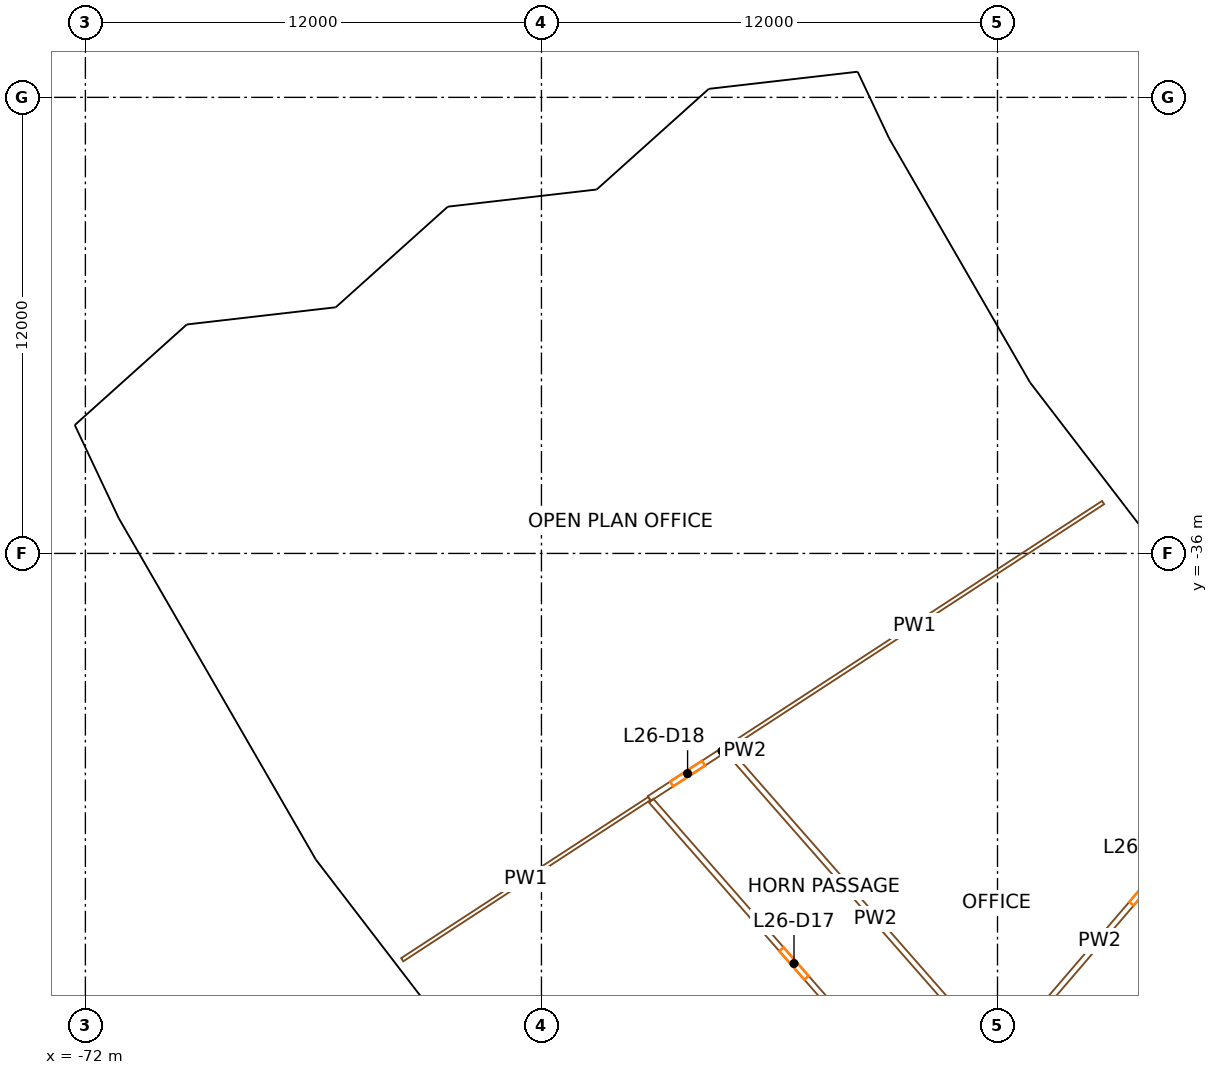
"""IFC4 building model, lengths in metres.
Left out: names, types, materials, properties, quantities, classifications, styles, units other than length and angle.
Written with IfcOpenShell. Run it as: python <this file> out.ifc"""

import sys

from ifc_helpers import new_model, si_unit, direction, frame, frame_2d, origin, origin_2d, place, context, subcontext, project, spatial, rectangle, extrude, element, fill, save


model = new_model("IFC4")
c1 = context("Model", 3, precision=1e-05, world=origin(), true_north=direction((0.0, 1.0)))
c2 = subcontext(c1, "Body", "Model", "MODEL_VIEW")
j1 = project(units=[si_unit("LENGTHUNIT", "METRE"), si_unit("PLANEANGLEUNIT", "RADIAN")], contexts=[c1])
p1 = place(None, origin())
s1 = spatial("IfcSite", under=j1, at=p1, CompositionType="ELEMENT")
p2 = place(p1, origin())
s2 = spatial("IfcBuilding", under=s1, at=p2, CompositionType="ELEMENT")
p3 = place(p2, frame((0.0, 0.0, 117.7)))
s3 = spatial("IfcBuildingStorey", under=s2, at=p3, CompositionType="ELEMENT", Elevation=117.7)
for number, where, z_axis, x_axis in (
    (1, (-52.243, -25.763, 0.0), (0.0, 0.0, 1.0), (0.442, -0.897, 0.0)),
    (2, (-69.732, -34.388, 0.0), (0.0, 0.0, 1.0), (0.442, -0.897, 0.0)),
    (3, (-48.433, -32.362, 0.0), (0.0, 0.0, 1.0), (0.556, -0.831, 0.0)),
    (4, (-64.647, -43.196, 0.0), (0.0, 0.0, 1.0), (0.556, -0.831, 0.0)),
    (5, (-43.795, -38.407, 0.0), (0.0, 0.0, 1.0), (0.659, -0.752, 0.0)),
):
    element("IfcColumn", number, at=place(p3, frame(where, z_axis=z_axis, x_axis=x_axis)), inside=s3, PredefinedType="COLUMN", context=c2, shape_type="SweptSolid", body=[
        extrude(rectangle(XDim=1.2, YDim=1.5, at=origin_2d()), origin(), (0.0, 0.0, 1.0), 3.8),
    ])
p4 = place(p3, frame((-49.779, -57.191, 0.0), z_axis=(0.0, 0.0, 1.0), x_axis=(0.573577477574, 0.819151315216, 0.0)))
e6 = element("IfcWall", 6, at=p4, inside=s3, PredefinedType="SHEAR", context=c2, shape_type="SweptSolid", body=[
    extrude(rectangle(XDim=14.8, YDim=0.9, at=frame_2d((7.4, 0.0))), origin(), (0.0, 0.0, 1.0), 3.5),
])
p5 = place(p4, frame((6.7, 0.0, 0.0)))
e7 = element("IfcOpeningElement", 7, at=p5, cuts=e6, PredefinedType="OPENING", context=c2, shape_type="SweptSolid", body=[
    extrude(rectangle(XDim=1.4, YDim=2.1, at=frame_2d((0.7, 1.05))), frame((0.0, 0.46, 0.0), z_axis=(0.0, -1.0, 0.0), x_axis=(1.0, 0.0, 0.0)), (0.0, 0.0, 1.0), 0.92),
])
p6 = place(p3, frame((-52.048, -23.569, 0.0), z_axis=(0.0, 0.0, 1.0), x_axis=(-0.993433070423, -0.114414748132, 0.0)))
e8 = element("IfcWall", 8, at=p6, inside=s3, PredefinedType="SOLIDWALL", context=c2, shape_type="SweptSolid", body=[
    extrude(rectangle(XDim=3.275, YDim=0.4, at=frame_2d((1.638, 0.0))), origin(), (0.0, 0.0, 1.0), 2.7),
])
p7 = place(p6, frame((0.638, 0.0, 0.9)))
e9 = element("IfcOpeningElement", 9, at=p7, cuts=e8, PredefinedType="OPENING", context=c2, shape_type="SweptSolid", body=[
    extrude(rectangle(XDim=2.0, YDim=1.425, at=frame_2d((1.0, 0.712))), frame((0.0, 0.21, 0.0), z_axis=(0.0, -1.0, 0.0), x_axis=(1.0, 0.0, 0.0)), (0.0, 0.0, 1.0), 0.42),
])
p8 = place(p3, frame((-55.424, -23.891, 0.0), z_axis=(0.0, 0.0, 1.0), x_axis=(-0.744202221748, -0.667954379539, 0.0)))
e10 = element("IfcWall", 10, at=p8, inside=s3, PredefinedType="SOLIDWALL", context=c2, shape_type="SweptSolid", body=[
    extrude(rectangle(XDim=4.195, YDim=0.4, at=frame_2d((2.097, 0.0))), origin(), (0.0, 0.0, 1.0), 2.7),
])
p9 = place(p8, frame((1.097, 0.0, 0.9)))
e11 = element("IfcOpeningElement", 11, at=p9, cuts=e10, PredefinedType="OPENING", context=c2, shape_type="SweptSolid", body=[
    extrude(rectangle(XDim=2.0, YDim=1.425, at=frame_2d((1.0, 0.712))), frame((0.0, 0.21, 0.0), z_axis=(0.0, -1.0, 0.0), x_axis=(1.0, 0.0, 0.0)), (0.0, 0.0, 1.0), 0.42),
])
p10 = place(p3, frame((-58.668, -26.64, 0.0), z_axis=(0.0, 0.0, 1.0), x_axis=(-0.993423489037, -0.114497910151, 0.0)))
e12 = element("IfcWall", 12, at=p10, inside=s3, PredefinedType="SOLIDWALL", context=c2, shape_type="SweptSolid", body=[
    extrude(rectangle(XDim=3.525, YDim=0.4, at=frame_2d((1.762, 0.0))), origin(), (0.0, 0.0, 1.0), 2.7),
])
p11 = place(p10, frame((0.762, 0.0, 0.9)))
e13 = element("IfcOpeningElement", 13, at=p11, cuts=e12, PredefinedType="OPENING", context=c2, shape_type="SweptSolid", body=[
    extrude(rectangle(XDim=2.0, YDim=1.425, at=frame_2d((1.0, 0.712))), frame((0.0, 0.21, 0.0), z_axis=(0.0, -1.0, 0.0), x_axis=(1.0, 0.0, 0.0)), (0.0, 0.0, 1.0), 0.42),
])
p12 = place(p3, frame((-62.292, -26.99, 0.0), z_axis=(0.0, 0.0, 1.0), x_axis=(-0.744130218911, -0.668034592894, 0.0)))
e14 = element("IfcWall", 14, at=p12, inside=s3, PredefinedType="SOLIDWALL", context=c2, shape_type="SweptSolid", body=[
    extrude(rectangle(XDim=4.193, YDim=0.4, at=frame_2d((2.097, 0.0))), origin(), (0.0, 0.0, 1.0), 2.7),
])
p13 = place(p12, frame((1.097, 0.0, 0.9)))
e15 = element("IfcOpeningElement", 15, at=p13, cuts=e14, PredefinedType="OPENING", context=c2, shape_type="SweptSolid", body=[
    extrude(rectangle(XDim=2.0, YDim=1.425, at=frame_2d((1.0, 0.712))), frame((0.0, 0.21, 0.0), z_axis=(0.0, -1.0, 0.0), x_axis=(1.0, 0.0, 0.0)), (0.0, 0.0, 1.0), 0.42),
])
p14 = place(p3, frame((-65.534, -29.739, 0.0), z_axis=(0.0, 0.0, 1.0), x_axis=(-0.993412271187, -0.114595198217, 0.0)))
e16 = element("IfcWall", 16, at=p14, inside=s3, PredefinedType="SOLIDWALL", context=c2, shape_type="SweptSolid", body=[
    extrude(rectangle(XDim=3.526, YDim=0.4, at=frame_2d((1.763, 0.0))), origin(), (0.0, 0.0, 1.0), 2.7),
])
p15 = place(p14, frame((0.763, 0.0, 0.9)))
e17 = element("IfcOpeningElement", 17, at=p15, cuts=e16, PredefinedType="OPENING", context=c2, shape_type="SweptSolid", body=[
    extrude(rectangle(XDim=2.0, YDim=1.425, at=frame_2d((1.0, 0.712))), frame((0.0, 0.21, 0.0), z_axis=(0.0, -1.0, 0.0), x_axis=(1.0, 0.0, 0.0)), (0.0, 0.0, 1.0), 0.42),
])
p16 = place(p3, frame((-69.159, -30.09, 0.0), z_axis=(0.0, 0.0, 1.0), x_axis=(-0.744101163547, -0.66806695653, 0.0)))
e18 = element("IfcWall", 18, at=p16, inside=s3, PredefinedType="SOLIDWALL", context=c2, shape_type="SweptSolid", body=[
    extrude(rectangle(XDim=4.014, YDim=0.4, at=frame_2d((2.007, 0.0))), origin(), (0.0, 0.0, 1.0), 2.7),
])
p17 = place(p16, frame((1.007, 0.0, 0.9)))
e19 = element("IfcOpeningElement", 19, at=p17, cuts=e18, PredefinedType="OPENING", context=c2, shape_type="SweptSolid", body=[
    extrude(rectangle(XDim=2.0, YDim=1.425, at=frame_2d((1.0, 0.712))), frame((0.0, 0.21, 0.0), z_axis=(0.0, -1.0, 0.0), x_axis=(1.0, 0.0, 0.0)), (0.0, 0.0, 1.0), 0.42),
])
p18 = place(p3, frame((-51.024, -25.184, 0.0), z_axis=(0.0, 0.0, 1.0), x_axis=(-0.426862665896, 0.904316462564, 0.0)))
e20 = element("IfcWall", 20, at=p18, inside=s3, PredefinedType="SOLIDWALL", context=c2, shape_type="SweptSolid", body=[
    extrude(rectangle(XDim=2.008, YDim=0.4, at=frame_2d((1.004, 0.0))), origin(), (0.0, 0.0, 1.0), 2.7),
])
p19 = place(p3, frame((-47.336, -31.568, 0.0), z_axis=(0.0, 0.0, 1.0), x_axis=(-0.499990592807, 0.866030834962, 0.0)))
e21 = element("IfcWall", 21, at=p19, inside=s3, PredefinedType="SOLIDWALL", context=c2, shape_type="SweptSolid", body=[
    extrude(rectangle(XDim=7.356, YDim=0.4, at=frame_2d((3.678, 0.0))), origin(), (0.0, 0.0, 1.0), 2.7),
])
p20 = place(p19, frame((4.225, 0.0, 0.9)))
e22 = element("IfcOpeningElement", 22, at=p20, cuts=e21, PredefinedType="OPENING", context=c2, shape_type="SweptSolid", body=[
    extrude(rectangle(XDim=2.6, YDim=1.65, at=frame_2d((1.3, 0.825))), frame((0.0, 0.21, 0.0), z_axis=(0.0, -1.0, 0.0), x_axis=(1.0, 0.0, 0.0)), (0.0, 0.0, 1.0), 0.42),
])
p21 = place(p19, frame((0.517, 0.0, 0.9)))
e23 = element("IfcOpeningElement", 23, at=p21, cuts=e21, PredefinedType="OPENING", context=c2, shape_type="SweptSolid", body=[
    extrude(rectangle(XDim=2.6, YDim=1.65, at=frame_2d((1.3, 0.825))), frame((0.0, 0.21, 0.0), z_axis=(0.0, -1.0, 0.0), x_axis=(1.0, 0.0, 0.0)), (0.0, 0.0, 1.0), 0.42),
])
p22 = place(p3, frame((-42.765, -37.537, 0.0), z_axis=(0.0, 0.0, 1.0), x_axis=(-0.608748204711, 0.793363487476, 0.0)))
e24 = element("IfcWall", 24, at=p22, inside=s3, PredefinedType="SOLIDWALL", context=c2, shape_type="SweptSolid", body=[
    extrude(rectangle(XDim=7.493, YDim=0.4, at=frame_2d((3.747, 0.0))), origin(), (0.0, 0.0, 1.0), 2.7),
])
p23 = place(p22, frame((4.301, 0.0, 0.9)))
e25 = element("IfcOpeningElement", 25, at=p23, cuts=e24, PredefinedType="OPENING", context=c2, shape_type="SweptSolid", body=[
    extrude(rectangle(XDim=2.6, YDim=1.65, at=frame_2d((1.3, 0.825))), frame((0.0, 0.21, 0.0), z_axis=(0.0, -1.0, 0.0), x_axis=(1.0, 0.0, 0.0)), (0.0, 0.0, 1.0), 0.42),
])
p24 = place(p22, frame((0.592, 0.0, 0.9)))
e26 = element("IfcOpeningElement", 26, at=p24, cuts=e24, PredefinedType="OPENING", context=c2, shape_type="SweptSolid", body=[
    extrude(rectangle(XDim=2.6, YDim=1.65, at=frame_2d((1.3, 0.825))), frame((0.0, 0.21, 0.0), z_axis=(0.0, -1.0, 0.0), x_axis=(1.0, 0.0, 0.0)), (0.0, 0.0, 1.0), 0.42),
])
p25 = place(p3, frame((-63.663, -46.691, 0.0), z_axis=(0.0, 0.0, 1.0), x_axis=(0.837558660213, 0.546347408433, 0.0)))
e27 = element("IfcWall", 27, at=p25, inside=s3, PredefinedType="PARTITIONING", context=c2, shape_type="SweptSolid", body=[
    extrude(rectangle(XDim=7.762, YDim=0.1, at=frame_2d((3.881, 0.0))), origin(), (0.0, 0.0, 1.0), 2.4),
])
p26 = place(p3, frame((-57.162, -42.45, 0.0), z_axis=(0.0, 0.0, 1.0), x_axis=(0.837554034944, 0.546354498974, 0.0)))
e28 = element("IfcWall", 28, at=p26, inside=s3, PredefinedType="PARTITIONING", context=c2, shape_type="SweptSolid", body=[
    extrude(rectangle(XDim=2.405, YDim=0.15, at=frame_2d((1.202, 0.0))), origin(), (0.0, 0.0, 1.0), 2.4),
])
p27 = place(p26, frame((0.702, 0.0, 0.0)))
e29 = element("IfcOpeningElement", 29, at=p27, cuts=e28, PredefinedType="OPENING", context=c2, shape_type="SweptSolid", body=[
    extrude(rectangle(XDim=1.0, YDim=2.1, at=frame_2d((0.5, 1.05))), frame((0.0, 0.085, 0.0), z_axis=(0.0, -1.0, 0.0), x_axis=(1.0, 0.0, 0.0)), (0.0, 0.0, 1.0), 0.17),
])
p28 = place(p3, frame((-55.148, -41.136, 0.0), z_axis=(0.0, 0.0, 1.0), x_axis=(0.837561412918, 0.546343188473, 0.0)))
e30 = element("IfcWall", 30, at=p28, inside=s3, PredefinedType="PARTITIONING", context=c2, shape_type="SweptSolid", body=[
    extrude(rectangle(XDim=11.851, YDim=0.1, at=frame_2d((5.925, 0.0))), origin(), (0.0, 0.0, 1.0), 2.4),
])
p29 = place(p3, frame((-49.597, -51.075, 0.0), z_axis=(0.0, 0.0, 1.0), x_axis=(-0.659347342495, 0.751838467987, 0.0)))
e31 = element("IfcWall", 31, at=p29, inside=s3, PredefinedType="PARTITIONING", context=c2, shape_type="SweptSolid", body=[
    extrude(rectangle(XDim=11.398, YDim=0.15, at=frame_2d((5.699, 0.0))), origin(), (0.0, 0.0, 1.0), 2.4),
])
p30 = place(p29, frame((5.199, 0.0, 0.0)))
e32 = element("IfcOpeningElement", 32, at=p30, cuts=e31, PredefinedType="OPENING", context=c2, shape_type="SweptSolid", body=[
    extrude(rectangle(XDim=1.0, YDim=2.1, at=frame_2d((0.5, 1.05))), frame((0.0, 0.085, 0.0), z_axis=(0.0, -1.0, 0.0), x_axis=(1.0, 0.0, 0.0)), (0.0, 0.0, 1.0), 0.17),
])
p31 = place(p3, frame((-48.032, -49.25, 0.0), z_axis=(0.0, 0.0, 1.0), x_axis=(-0.659337984036, 0.751846675066, 0.0)))
e33 = element("IfcWall", 33, at=p31, inside=s3, PredefinedType="PARTITIONING", context=c2, shape_type="SweptSolid", body=[
    extrude(rectangle(XDim=10.718, YDim=0.15, at=frame_2d((5.359, 0.0))), origin(), (0.0, 0.0, 1.0), 2.4),
])
p32 = place(p3, frame((-48.031, -49.364, 0.0), z_axis=(0.0, 0.0, 1.0), x_axis=(0.650981860867, 0.759093285982, 0.0)))
e34 = element("IfcWall", 34, at=p32, inside=s3, PredefinedType="PARTITIONING", context=c2, shape_type="SweptSolid", body=[
    extrude(rectangle(XDim=11.926, YDim=0.15, at=frame_2d((5.963, 0.0))), origin(), (0.0, 0.0, 1.0), 2.4),
])
p33 = place(p32, frame((5.463, 0.0, 0.0)))
e35 = element("IfcOpeningElement", 35, at=p33, cuts=e34, PredefinedType="OPENING", context=c2, shape_type="SweptSolid", body=[
    extrude(rectangle(XDim=1.0, YDim=2.1, at=frame_2d((0.5, 1.05))), frame((0.0, 0.085, 0.0), z_axis=(0.0, -1.0, 0.0), x_axis=(1.0, 0.0, 0.0)), (0.0, 0.0, 1.0), 0.17),
])
p34 = place(p20, origin())
e36 = element("IfcWindow", 36, at=p34, inside=s3, PartitioningType="SINGLE_PANEL", PredefinedType="WINDOW", context=c2, shape_type="SweptSolid", body=[
    extrude(rectangle(XDim=2.6, YDim=1.65, at=frame_2d((1.3, 0.825))), frame((0.0, 0.03, 0.0), z_axis=(0.0, -1.0, 0.0), x_axis=(1.0, 0.0, 0.0)), (0.0, 0.0, 1.0), 0.06),
])
fill(e22, e36)
p35 = place(p21, origin())
e37 = element("IfcWindow", 37, at=p35, inside=s3, PartitioningType="SINGLE_PANEL", PredefinedType="WINDOW", context=c2, shape_type="SweptSolid", body=[
    extrude(rectangle(XDim=2.6, YDim=1.65, at=frame_2d((1.3, 0.825))), frame((0.0, 0.03, 0.0), z_axis=(0.0, -1.0, 0.0), x_axis=(1.0, 0.0, 0.0)), (0.0, 0.0, 1.0), 0.06),
])
fill(e23, e37)
p36 = place(p23, origin())
e38 = element("IfcWindow", 38, at=p36, inside=s3, PartitioningType="SINGLE_PANEL", PredefinedType="WINDOW", context=c2, shape_type="SweptSolid", body=[
    extrude(rectangle(XDim=2.6, YDim=1.65, at=frame_2d((1.3, 0.825))), frame((0.0, 0.03, 0.0), z_axis=(0.0, -1.0, 0.0), x_axis=(1.0, 0.0, 0.0)), (0.0, 0.0, 1.0), 0.06),
])
fill(e25, e38)
p37 = place(p24, origin())
e39 = element("IfcWindow", 39, at=p37, inside=s3, PartitioningType="SINGLE_PANEL", PredefinedType="WINDOW", context=c2, shape_type="SweptSolid", body=[
    extrude(rectangle(XDim=2.6, YDim=1.65, at=frame_2d((1.3, 0.825))), frame((0.0, 0.03, 0.0), z_axis=(0.0, -1.0, 0.0), x_axis=(1.0, 0.0, 0.0)), (0.0, 0.0, 1.0), 0.06),
])
fill(e26, e39)
p38 = place(p7, origin())
e40 = element("IfcWindow", 40, at=p38, inside=s3, PartitioningType="SINGLE_PANEL", PredefinedType="WINDOW", context=c2, shape_type="SweptSolid", body=[
    extrude(rectangle(XDim=2.0, YDim=1.425, at=frame_2d((1.0, 0.712))), frame((0.0, 0.03, 0.0), z_axis=(0.0, -1.0, 0.0), x_axis=(1.0, 0.0, 0.0)), (0.0, 0.0, 1.0), 0.06),
])
fill(e9, e40)
p39 = place(p9, origin())
e41 = element("IfcWindow", 41, at=p39, inside=s3, PartitioningType="SINGLE_PANEL", PredefinedType="WINDOW", context=c2, shape_type="SweptSolid", body=[
    extrude(rectangle(XDim=2.0, YDim=1.425, at=frame_2d((1.0, 0.712))), frame((0.0, 0.03, 0.0), z_axis=(0.0, -1.0, 0.0), x_axis=(1.0, 0.0, 0.0)), (0.0, 0.0, 1.0), 0.06),
])
fill(e11, e41)
p40 = place(p11, origin())
e42 = element("IfcWindow", 42, at=p40, inside=s3, PartitioningType="SINGLE_PANEL", PredefinedType="WINDOW", context=c2, shape_type="SweptSolid", body=[
    extrude(rectangle(XDim=2.0, YDim=1.425, at=frame_2d((1.0, 0.712))), frame((0.0, 0.03, 0.0), z_axis=(0.0, -1.0, 0.0), x_axis=(1.0, 0.0, 0.0)), (0.0, 0.0, 1.0), 0.06),
])
fill(e13, e42)
p41 = place(p13, origin())
e43 = element("IfcWindow", 43, at=p41, inside=s3, PartitioningType="SINGLE_PANEL", PredefinedType="WINDOW", context=c2, shape_type="SweptSolid", body=[
    extrude(rectangle(XDim=2.0, YDim=1.425, at=frame_2d((1.0, 0.712))), frame((0.0, 0.03, 0.0), z_axis=(0.0, -1.0, 0.0), x_axis=(1.0, 0.0, 0.0)), (0.0, 0.0, 1.0), 0.06),
])
fill(e15, e43)
p42 = place(p15, origin())
e44 = element("IfcWindow", 44, at=p42, inside=s3, PartitioningType="SINGLE_PANEL", PredefinedType="WINDOW", context=c2, shape_type="SweptSolid", body=[
    extrude(rectangle(XDim=2.0, YDim=1.425, at=frame_2d((1.0, 0.712))), frame((0.0, 0.03, 0.0), z_axis=(0.0, -1.0, 0.0), x_axis=(1.0, 0.0, 0.0)), (0.0, 0.0, 1.0), 0.06),
])
fill(e17, e44)
p43 = place(p17, origin())
e45 = element("IfcWindow", 45, at=p43, inside=s3, PartitioningType="SINGLE_PANEL", PredefinedType="WINDOW", context=c2, shape_type="SweptSolid", body=[
    extrude(rectangle(XDim=2.0, YDim=1.425, at=frame_2d((1.0, 0.712))), frame((0.0, 0.03, 0.0), z_axis=(0.0, -1.0, 0.0), x_axis=(1.0, 0.0, 0.0)), (0.0, 0.0, 1.0), 0.06),
])
fill(e19, e45)
p44 = place(p33, origin())
e46 = element("IfcDoor", 46, at=p44, inside=s3, OperationType="SINGLE_SWING_RIGHT", PredefinedType="DOOR", context=c2, shape_type="SweptSolid", body=[
    extrude(rectangle(XDim=1.0, YDim=2.1, at=frame_2d((0.5, 1.05))), frame((0.0, 0.025, 0.0), z_axis=(0.0, -1.0, 0.0), x_axis=(1.0, 0.0, 0.0)), (0.0, 0.0, 1.0), 0.05),
])
fill(e35, e46)
p45 = place(p30, origin())
e47 = element("IfcDoor", 47, at=p45, inside=s3, OperationType="SINGLE_SWING_RIGHT", PredefinedType="DOOR", context=c2, shape_type="SweptSolid", body=[
    extrude(rectangle(XDim=1.0, YDim=2.1, at=frame_2d((0.5, 1.05))), frame((0.0, 0.025, 0.0), z_axis=(0.0, -1.0, 0.0), x_axis=(1.0, 0.0, 0.0)), (0.0, 0.0, 1.0), 0.05),
])
fill(e32, e47)
p46 = place(p27, origin())
e48 = element("IfcDoor", 48, at=p46, inside=s3, OperationType="SINGLE_SWING_RIGHT", PredefinedType="DOOR", context=c2, shape_type="SweptSolid", body=[
    extrude(rectangle(XDim=1.0, YDim=2.1, at=frame_2d((0.5, 1.05))), frame((0.0, 0.025, 0.0), z_axis=(0.0, -1.0, 0.0), x_axis=(1.0, 0.0, 0.0)), (0.0, 0.0, 1.0), 0.05),
])
fill(e29, e48)
save(model, sys.argv[1])
